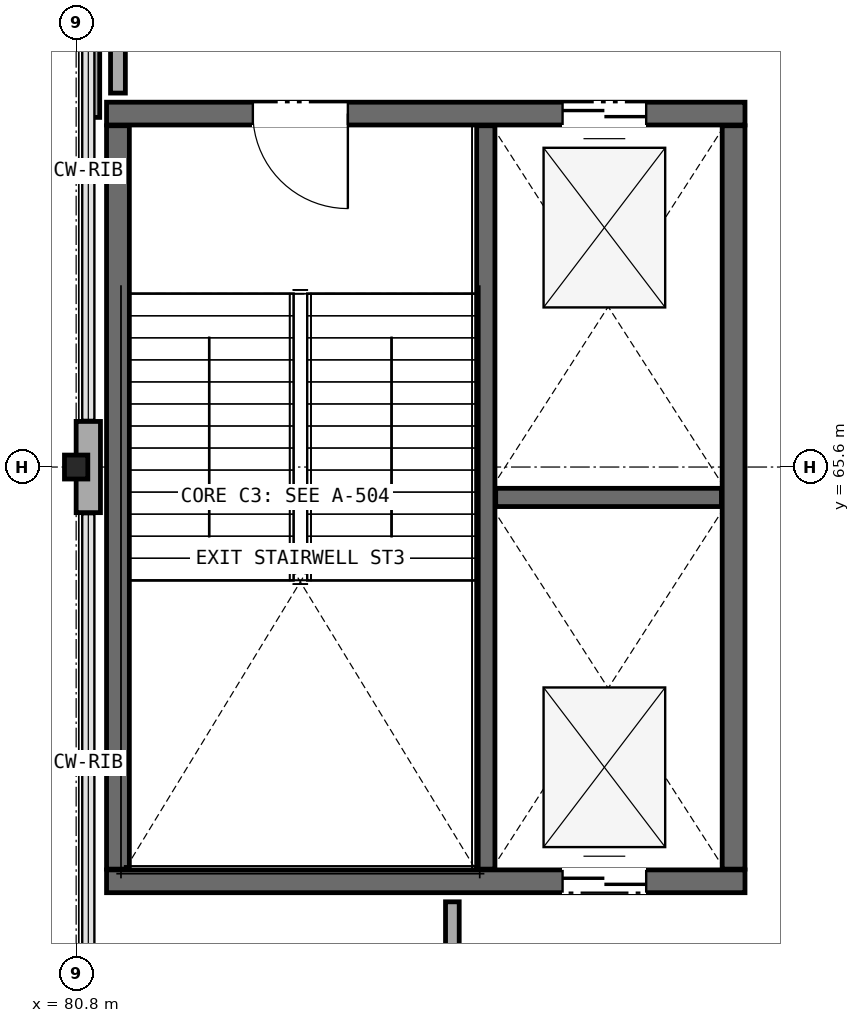
"""IFC4 building model, lengths in metres.
Left out: names, types, materials, properties, quantities, classifications, styles, units other than length and angle.
Written with IfcOpenShell. Run it as: python <this file> out.ifc"""

import sys

from ifc_helpers import new_model, si_unit, direction, frame, frame_2d, origin, origin_2d, place, context, subcontext, project, spatial, rectangle, i_section, extrude, element, fill, save


model = new_model("IFC4")
c1 = context("Model", 3, precision=1e-05, world=origin(), true_north=direction((0.0, 1.0)))
c2 = subcontext(c1, "Body", "Model", "MODEL_VIEW")
j1 = project(units=[si_unit("LENGTHUNIT", "METRE"), si_unit("PLANEANGLEUNIT", "RADIAN")], contexts=[c1])
p1 = place(None, origin())
s1 = spatial("IfcSite", under=j1, at=p1, CompositionType="ELEMENT")
p2 = place(p1, origin())
s2 = spatial("IfcBuilding", under=s1, at=p2, CompositionType="ELEMENT")
p3 = place(p2, frame((0.0, 0.0, 19.1)))
s3 = spatial("IfcBuildingStorey", under=s2, at=p3, CompositionType="ELEMENT", Elevation=19.1)
p4 = place(p3, frame((80.8, 65.6, 0.0), z_axis=(0.0, 0.0, 1.0), x_axis=(1.0, 0.0, 0.0)))
e1 = element("IfcColumn", 1, at=p4, inside=s3, PredefinedType="COLUMN", context=c2, shape_type="SweptSolid", body=[
    extrude(i_section(OverallWidth=0.307, OverallDepth=0.315, WebThickness=0.012, FlangeThickness=0.019, FilletRadius=0.017, at=origin_2d()), origin(), (0.0, 0.0, 1.0), 9.0),
])
p5 = place(p3, frame((80.96, 66.2, 0.0), z_axis=(0.0, 0.0, 1.0), x_axis=(0.0, -1.0, 0.0)))
e2 = element("IfcWall", 2, at=p5, inside=s3, PredefinedType="STANDARD", context=c2, shape_type="SweptSolid", body=[
    extrude(rectangle(XDim=1.2, YDim=0.32, at=frame_2d((0.6, 0.0))), origin(), (0.0, 0.0, 1.0), 8.278),
])
p6 = place(p3, frame((81.2, 60.15, 0.0), z_axis=(0.0, 0.0, 1.0), x_axis=(1.0, 0.0, 0.0)))
e3 = element("IfcWall", 3, at=p6, inside=s3, PredefinedType="SHEAR", context=c2, shape_type="SweptSolid", body=[
    extrude(rectangle(XDim=8.4, YDim=0.3, at=frame_2d((4.2, 0.0))), origin(), (0.0, 0.0, 1.0), 8.745),
])
p7 = place(p6, frame((6.0, 0.0, 0.0)))
e4 = element("IfcOpeningElement", 4, at=p7, cuts=e3, PredefinedType="OPENING", context=c2, shape_type="SweptSolid", body=[
    extrude(rectangle(XDim=1.1, YDim=2.2, at=frame_2d((0.55, 1.1))), frame((0.0, 0.16, 0.0), z_axis=(0.0, -1.0, 0.0), x_axis=(1.0, 0.0, 0.0)), (0.0, 0.0, 1.0), 0.32),
])
p8 = place(p3, frame((89.6, 70.25, 0.0), z_axis=(0.0, 0.0, 1.0), x_axis=(-1.0, 0.0, 0.0)))
e5 = element("IfcWall", 5, at=p8, inside=s3, PredefinedType="SHEAR", context=c2, shape_type="SweptSolid", body=[
    extrude(rectangle(XDim=8.4, YDim=0.3, at=frame_2d((4.2, 0.0))), origin(), (0.0, 0.0, 1.0), 8.745),
])
p9 = place(p8, frame((5.225, 0.0, 0.0)))
e6 = element("IfcOpeningElement", 6, at=p9, cuts=e5, PredefinedType="OPENING", context=c2, shape_type="SweptSolid", body=[
    extrude(rectangle(XDim=1.25, YDim=2.2, at=frame_2d((0.625, 1.1))), frame((0.0, 0.16, 0.0), z_axis=(0.0, -1.0, 0.0), x_axis=(1.0, 0.0, 0.0)), (0.0, 0.0, 1.0), 0.32),
])
p10 = place(p8, frame((1.3, 0.0, 0.0)))
e7 = element("IfcOpeningElement", 7, at=p10, cuts=e5, PredefinedType="OPENING", context=c2, shape_type="SweptSolid", body=[
    extrude(rectangle(XDim=1.1, YDim=2.2, at=frame_2d((0.55, 1.1))), frame((0.0, 0.16, 0.0), z_axis=(0.0, -1.0, 0.0), x_axis=(1.0, 0.0, 0.0)), (0.0, 0.0, 1.0), 0.32),
])
for number, where, z_axis, x_axis in (
    (8, (89.45, 60.31, 0.0), (0.0, 0.0, 1.0), (0.0, 1.0, 0.0)),
    (9, (81.35, 70.09, 0.0), (0.0, 0.0, 1.0), (0.0, -1.0, 0.0)),
):
    element("IfcWall", number, at=place(p3, frame(where, z_axis=z_axis, x_axis=x_axis)), inside=s3, PredefinedType="SHEAR", context=c2, shape_type="SweptSolid", body=[
        extrude(rectangle(XDim=9.78, YDim=0.3, at=frame_2d((4.89, 0.0))), origin(), (0.0, 0.0, 1.0), 8.745),
    ])
p11 = place(p3, frame((86.19, 60.31, 0.0), z_axis=(0.0, 0.0, 1.0), x_axis=(0.0, 1.0, 0.0)))
e10 = element("IfcWall", 10, at=p11, inside=s3, PredefinedType="SOLIDWALL", context=c2, shape_type="SweptSolid", body=[
    extrude(rectangle(XDim=9.78, YDim=0.24, at=frame_2d((4.89, 0.0))), origin(), (0.0, 0.0, 1.0), 8.745),
])
p12 = place(p3, frame((86.32, 65.2, 0.0), z_axis=(0.0, 0.0, 1.0), x_axis=(1.0, 0.0, 0.0)))
e11 = element("IfcWall", 11, at=p12, inside=s3, PredefinedType="SOLIDWALL", context=c2, shape_type="SweptSolid", body=[
    extrude(rectangle(XDim=2.97, YDim=0.24, at=frame_2d((1.485, 0.0))), origin(), (0.0, 0.0, 1.0), 8.745),
])
p13 = place(p3, frame((81.35, 73.74, 0.0), z_axis=(0.0, 0.0, 1.0), x_axis=(0.0, -1.0, 0.0)))
e12 = element("IfcWall", 12, at=p13, inside=s3, PredefinedType="PARTITIONING", context=c2, shape_type="SweptSolid", body=[
    extrude(rectangle(XDim=3.22, YDim=0.195, at=frame_2d((1.61, 0.0))), origin(), (0.0, 0.0, 1.0), 8.63),
])
p14 = place(p3, frame((85.75, 59.88, 0.0), z_axis=(0.0, 0.0, 1.0), x_axis=(0.0, -1.0, 0.0)))
e13 = element("IfcWall", 13, at=p14, inside=s3, PredefinedType="PARTITIONING", context=c2, shape_type="SweptSolid", body=[
    extrude(rectangle(XDim=2.62, YDim=0.18, at=frame_2d((1.31, 0.0))), origin(), (0.0, 0.0, 1.0), 8.63),
])
p15 = place(p3, frame((81.02, 70.2, 0.0), z_axis=(0.0, 0.0, 1.0), x_axis=(0.0, 1.0, 0.0)))
e14 = element("IfcWall", 14, at=p15, inside=s3, PredefinedType="PARTITIONING", context=c2, shape_type="SweptSolid", body=[
    extrude(rectangle(XDim=2.6, YDim=0.18, at=frame_2d((1.3, 0.0))), origin(), (0.0, 0.0, 1.0), 2.9),
])
p16 = place(p9, origin())
e15 = element("IfcDoor", 15, at=p16, inside=s3, OperationType="SINGLE_SWING_LEFT", PredefinedType="DOOR", context=c2, shape_type="SweptSolid", body=[
    extrude(rectangle(XDim=1.25, YDim=2.2, at=frame_2d((0.625, 1.1))), frame((0.0, 0.025, 0.0), z_axis=(0.0, -1.0, 0.0), x_axis=(1.0, 0.0, 0.0)), (0.0, 0.0, 1.0), 0.05),
])
fill(e6, e15)
p17 = place(p7, origin())
e16 = element("IfcDoor", 16, at=p17, inside=s3, OperationType="DOUBLE_DOOR_SLIDING", PredefinedType="DOOR", context=c2, shape_type="SweptSolid", body=[
    extrude(rectangle(XDim=1.1, YDim=2.2, at=frame_2d((0.55, 1.1))), frame((0.0, 0.025, 0.0), z_axis=(0.0, -1.0, 0.0), x_axis=(1.0, 0.0, 0.0)), (0.0, 0.0, 1.0), 0.05),
])
fill(e4, e16)
p18 = place(p10, origin())
e17 = element("IfcDoor", 17, at=p18, inside=s3, OperationType="DOUBLE_DOOR_SLIDING", PredefinedType="DOOR", context=c2, shape_type="SweptSolid", body=[
    extrude(rectangle(XDim=1.1, YDim=2.2, at=frame_2d((0.55, 1.1))), frame((0.0, 0.025, 0.0), z_axis=(0.0, -1.0, 0.0), x_axis=(1.0, 0.0, 0.0)), (0.0, 0.0, 1.0), 0.05),
])
fill(e7, e17)
save(model, sys.argv[1])
